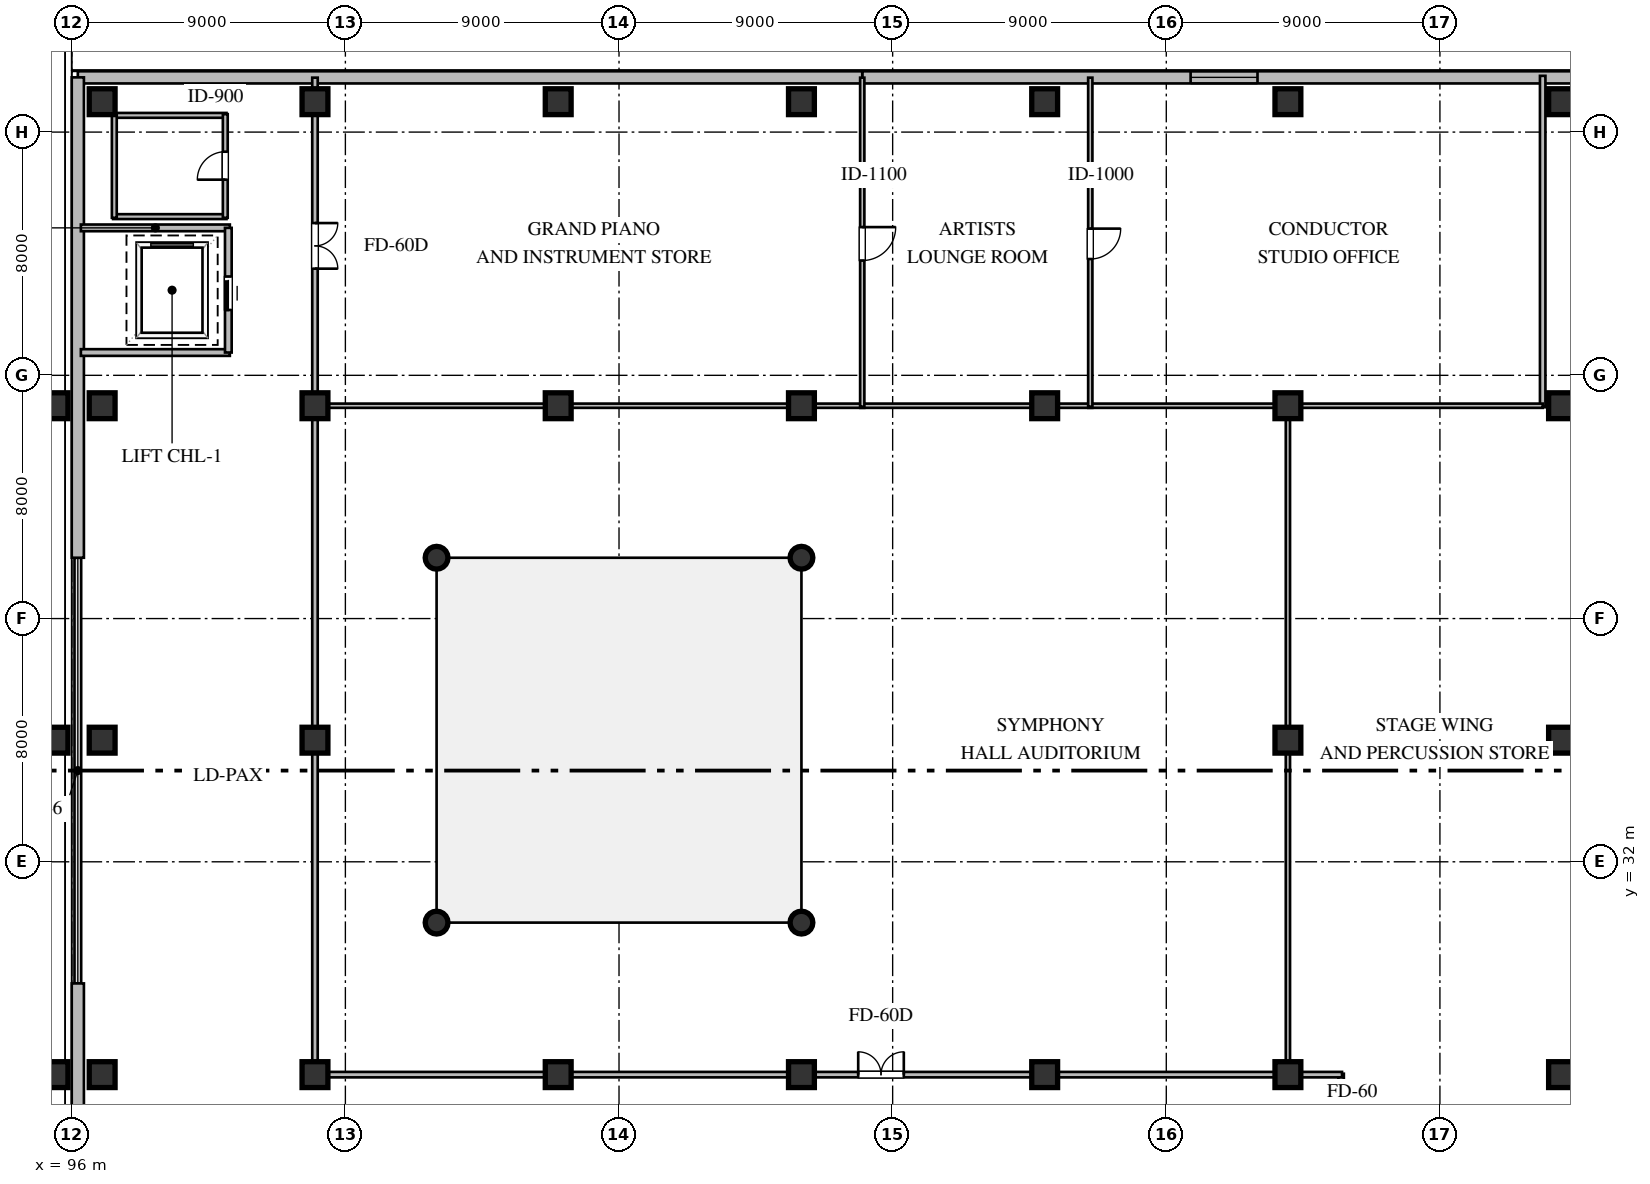
"""IFC4 building model, lengths in metres.
Left out: names, types, materials, properties, quantities, classifications, styles, units other than length and angle.
Written with IfcOpenShell. Run it as: python <this file> out.ifc"""

import sys

from ifc_helpers import new_model, si_unit, direction, frame, frame_2d, origin, origin_2d, place, context, subcontext, project, spatial, rectangle, circle, extrude, element, fill, save


model = new_model("IFC4")
c1 = context("Model", 3, precision=1e-05, world=origin(), true_north=direction((0.0, 1.0)))
c2 = subcontext(c1, "Body", "Model", "MODEL_VIEW")
j1 = project(units=[si_unit("LENGTHUNIT", "METRE"), si_unit("PLANEANGLEUNIT", "RADIAN")], contexts=[c1])
p1 = place(None, origin())
s1 = spatial("IfcSite", under=j1, at=p1, CompositionType="ELEMENT")
p2 = place(p1, origin())
s2 = spatial("IfcBuilding", under=s1, at=p2, CompositionType="ELEMENT")
p3 = place(p2, origin())
s3 = spatial("IfcBuildingStorey", under=s2, at=p3, CompositionType="ELEMENT", Elevation=0.0)
for number, where, z_axis, x_axis in (
    (1, (97.0, 25.0, 0.0), (0.0, 0.0, 1.0), (1.0, 0.0, 0.0)),
    (2, (97.0, 36.0, 0.0), (0.0, 0.0, 1.0), (1.0, 0.0, 0.0)),
    (3, (97.0, 47.0, 0.0), (0.0, 0.0, 1.0), (1.0, 0.0, 0.0)),
    (4, (97.0, 57.0, 0.0), (0.0, 0.0, 1.0), (1.0, 0.0, 0.0)),
    (5, (104.0, 25.0, 0.0), (0.0, 0.0, 1.0), (1.0, 0.0, 0.0)),
    (6, (104.0, 36.0, 0.0), (0.0, 0.0, 1.0), (1.0, 0.0, 0.0)),
    (7, (104.0, 47.0, 0.0), (0.0, 0.0, 1.0), (1.0, 0.0, 0.0)),
    (8, (104.0, 57.0, 0.0), (0.0, 0.0, 1.0), (1.0, 0.0, 0.0)),
    (9, (112.0, 25.0, 0.0), (0.0, 0.0, 1.0), (1.0, 0.0, 0.0)),
    (10, (112.0, 47.0, 0.0), (0.0, 0.0, 1.0), (1.0, 0.0, 0.0)),
    (11, (112.0, 57.0, 0.0), (0.0, 0.0, 1.0), (1.0, 0.0, 0.0)),
    (12, (120.0, 25.0, 0.0), (0.0, 0.0, 1.0), (1.0, 0.0, 0.0)),
    (13, (120.0, 47.0, 0.0), (0.0, 0.0, 1.0), (1.0, 0.0, 0.0)),
    (14, (120.0, 57.0, 0.0), (0.0, 0.0, 1.0), (1.0, 0.0, 0.0)),
    (15, (128.0, 25.0, 0.0), (0.0, 0.0, 1.0), (1.0, 0.0, 0.0)),
    (16, (128.0, 47.0, 0.0), (0.0, 0.0, 1.0), (1.0, 0.0, 0.0)),
    (17, (128.0, 57.0, 0.0), (0.0, 0.0, 1.0), (1.0, 0.0, 0.0)),
    (18, (136.0, 25.0, 0.0), (0.0, 0.0, 1.0), (1.0, 0.0, 0.0)),
    (19, (136.0, 36.0, 0.0), (0.0, 0.0, 1.0), (1.0, 0.0, 0.0)),
    (20, (136.0, 47.0, 0.0), (0.0, 0.0, 1.0), (1.0, 0.0, 0.0)),
    (21, (136.0, 57.0, 0.0), (0.0, 0.0, 1.0), (1.0, 0.0, 0.0)),
    (22, (145.0, 25.0, 0.0), (0.0, 0.0, 1.0), (1.0, 0.0, 0.0)),
    (23, (145.0, 36.0, 0.0), (0.0, 0.0, 1.0), (1.0, 0.0, 0.0)),
    (24, (145.0, 47.0, 0.0), (0.0, 0.0, 1.0), (1.0, 0.0, 0.0)),
    (25, (145.0, 57.0, 0.0), (0.0, 0.0, 1.0), (1.0, 0.0, 0.0)),
    (26, (95.45, 25.0, 0.0), (0.0, 0.0, 1.0), (1.0, 0.0, 0.0)),
    (27, (95.45, 36.0, 0.0), (0.0, 0.0, 1.0), (1.0, 0.0, 0.0)),
    (28, (95.45, 47.0, 0.0), (0.0, 0.0, 1.0), (1.0, 0.0, 0.0)),
):
    element("IfcColumn", number, at=place(p3, frame(where, z_axis=z_axis, x_axis=x_axis)), inside=s3, PredefinedType="COLUMN", context=c2, shape_type="SweptSolid", body=[
        extrude(rectangle(XDim=0.85, YDim=0.85, at=origin_2d()), origin(), (0.0, 0.0, 1.0), 4.8),
    ])
for number, where, z_axis, x_axis in (
    (29, (108.0, 30.0, 0.0), (0.0, 0.0, 1.0), (1.0, 0.0, 0.0)),
    (30, (108.0, 42.0, 0.0), (0.0, 0.0, 1.0), (1.0, 0.0, 0.0)),
):
    element("IfcColumn", number, at=place(p3, frame(where, z_axis=z_axis, x_axis=x_axis)), inside=s3, PredefinedType="COLUMN", context=c2, shape_type="SweptSolid", body=[
        extrude(circle(Radius=0.375, at=origin_2d()), origin(), (0.0, 0.0, 1.0), 2.13),
    ])
for number, where, z_axis, x_axis in (
    (31, (120.0, 30.0, 0.0), (0.0, 0.0, 1.0), (1.0, 0.0, 0.0)),
    (32, (120.0, 42.0, 0.0), (0.0, 0.0, 1.0), (1.0, 0.0, 0.0)),
):
    element("IfcColumn", number, at=place(p3, frame(where, z_axis=z_axis, x_axis=x_axis)), inside=s3, PredefinedType="COLUMN", context=c2, shape_type="SweptSolid", body=[
        extrude(circle(Radius=0.375, at=origin_2d()), origin(), (0.0, 0.0, 1.0), 0.44),
    ])
p4 = place(p3, frame((145.8, 57.8, 0.0), z_axis=(0.0, 0.0, 1.0), x_axis=(-1.0, 0.0, 0.0)))
e33 = element("IfcWall", 33, at=p4, inside=s3, PredefinedType="STANDARD", context=c2, shape_type="SweptSolid", body=[
    extrude(rectangle(XDim=23.8, YDim=0.4, at=frame_2d((11.9, 0.0))), origin(), (0.0, 0.0, 1.0), 4.52),
])
p5 = place(p4, frame((10.8, 0.0, 1.25)))
e34 = element("IfcOpeningElement", 34, at=p5, cuts=e33, PredefinedType="OPENING", context=c2, shape_type="SweptSolid", body=[
    extrude(rectangle(XDim=2.2, YDim=1.5, at=frame_2d((1.1, 0.75))), frame((0.0, 0.21, 0.0), z_axis=(0.0, -1.0, 0.0), x_axis=(1.0, 0.0, 0.0)), (0.0, 0.0, 1.0), 0.42),
])
p6 = place(p3, frame((122.0, 57.8, 0.0), z_axis=(0.0, 0.0, 1.0), x_axis=(-1.0, 0.0, 0.0)))
e35 = element("IfcWall", 35, at=p6, inside=s3, PredefinedType="STANDARD", context=c2, shape_type="SweptSolid", body=[
    extrude(rectangle(XDim=25.8, YDim=0.4, at=frame_2d((12.9, 0.0))), origin(), (0.0, 0.0, 1.0), 4.52),
])
p7 = place(p3, frame((96.2, 57.8, 0.0), z_axis=(0.0, 0.0, 1.0), x_axis=(0.0, -1.0, 0.0)))
e36 = element("IfcWall", 36, at=p7, inside=s3, PredefinedType="STANDARD", context=c2, shape_type="SweptSolid", body=[
    extrude(rectangle(XDim=15.8, YDim=0.4, at=frame_2d((7.9, 0.0))), origin(), (0.0, 0.0, 1.0), 4.52),
])
p8 = place(p3, frame((96.2, 28.0, 0.0), z_axis=(0.0, 0.0, 1.0), x_axis=(0.0, -1.0, 0.0)))
e37 = element("IfcWall", 37, at=p8, inside=s3, PredefinedType="STANDARD", context=c2, shape_type="SweptSolid", body=[
    extrude(rectangle(XDim=13.8, YDim=0.4, at=frame_2d((6.9, 0.0))), origin(), (0.0, 0.0, 1.0), 4.52),
])
for number, where, z_axis, x_axis in (
    (38, (96.3, 52.85, 0.0), (0.0, 0.0, 1.0), (1.0, 0.0, 0.0)),
    (39, (96.3, 48.75, 0.0), (0.0, 0.0, 1.0), (1.0, 0.0, 0.0)),
):
    element("IfcWall", number, at=place(p3, frame(where, z_axis=z_axis, x_axis=x_axis)), inside=s3, PredefinedType="SOLIDWALL", context=c2, shape_type="SweptSolid", body=[
        extrude(rectangle(XDim=4.9, YDim=0.22, at=frame_2d((2.45, 0.0))), origin(), (0.0, 0.0, 1.0), 4.52),
    ])
p9 = place(p3, frame((101.15, 48.75, 0.0), z_axis=(0.0, 0.0, 1.0), x_axis=(0.0, 1.0, 0.0)))
e40 = element("IfcWall", 40, at=p9, inside=s3, PredefinedType="SOLIDWALL", context=c2, shape_type="SweptSolid", body=[
    extrude(rectangle(XDim=4.1, YDim=0.22, at=frame_2d((2.05, 0.0))), origin(), (0.0, 0.0, 1.0), 4.52),
])
p10 = place(p9, frame((1.4, 0.0, 0.0)))
e41 = element("IfcOpeningElement", 41, at=p10, cuts=e40, PredefinedType="OPENING", context=c2, shape_type="SweptSolid", body=[
    extrude(rectangle(XDim=1.1, YDim=2.1, at=frame_2d((0.55, 1.05))), frame((0.0, 0.12, 0.0), z_axis=(0.0, -1.0, 0.0), x_axis=(1.0, 0.0, 0.0)), (0.0, 0.0, 1.0), 0.24),
])
p11 = place(p3, frame((97.36, 53.22, 0.0), z_axis=(0.0, 0.0, 1.0), x_axis=(1.0, 0.0, 0.0)))
e42 = element("IfcWall", 42, at=p11, inside=s3, PredefinedType="PLUMBINGWALL", context=c2, shape_type="SweptSolid", body=[
    extrude(rectangle(XDim=3.73, YDim=0.16, at=frame_2d((1.865, 0.0))), origin(), (0.0, 0.0, 1.0), 4.52),
])
p12 = place(p3, frame((97.36, 56.55, 0.0), z_axis=(0.0, 0.0, 1.0), x_axis=(1.0, 0.0, 0.0)))
e43 = element("IfcWall", 43, at=p12, inside=s3, PredefinedType="PLUMBINGWALL", context=c2, shape_type="SweptSolid", body=[
    extrude(rectangle(XDim=3.73, YDim=0.16, at=frame_2d((1.865, 0.0))), origin(), (0.0, 0.0, 1.0), 3.899),
])
p13 = place(p3, frame((97.4, 53.18, 0.0), z_axis=(0.0, 0.0, 1.0), x_axis=(0.0, 1.0, 0.0)))
e44 = element("IfcWall", 44, at=p13, inside=s3, PredefinedType="PLUMBINGWALL", context=c2, shape_type="SweptSolid", body=[
    extrude(rectangle(XDim=3.41, YDim=0.16, at=frame_2d((1.705, 0.0))), origin(), (0.0, 0.0, 1.0), 4.093),
])
p14 = place(p3, frame((101.05, 53.18, 0.0), z_axis=(0.0, 0.0, 1.0), x_axis=(0.0, 1.0, 0.0)))
e45 = element("IfcWall", 45, at=p14, inside=s3, PredefinedType="PLUMBINGWALL", context=c2, shape_type="SweptSolid", body=[
    extrude(rectangle(XDim=3.41, YDim=0.16, at=frame_2d((1.705, 0.0))), origin(), (0.0, 0.0, 1.0), 4.52),
])
p15 = place(p14, frame((1.255, 0.0, 0.0)))
e46 = element("IfcOpeningElement", 46, at=p15, cuts=e45, PredefinedType="OPENING", context=c2, shape_type="SweptSolid", body=[
    extrude(rectangle(XDim=0.92, YDim=2.1, at=frame_2d((0.46, 1.05))), frame((0.0, 0.09, 0.0), z_axis=(0.0, -1.0, 0.0), x_axis=(1.0, 0.0, 0.0)), (0.0, 0.0, 1.0), 0.18),
])
p16 = place(p3, frame((144.38, 46.95, 0.0), z_axis=(0.0, 0.0, 1.0), x_axis=(0.0, 1.0, 0.0)))
e47 = element("IfcWall", 47, at=p16, inside=s3, PredefinedType="PARTITIONING", context=c2, shape_type="SweptSolid", body=[
    extrude(rectangle(XDim=10.9, YDim=0.18, at=frame_2d((5.45, 0.0))), origin(), (0.0, 0.0, 1.0), 4.093),
])
p17 = place(p3, frame((103.97, 25.0, 0.0), z_axis=(0.0, 0.0, 1.0), x_axis=(1.0, 0.0, 0.0)))
e48 = element("IfcWall", 48, at=p17, inside=s3, PredefinedType="PARTITIONING", context=c2, shape_type="SweptSolid", body=[
    extrude(rectangle(XDim=32.095, YDim=0.18, at=frame_2d((16.047, 0.0))), origin(), (0.0, 0.0, 1.0), 3.899),
])
p18 = place(p17, frame((17.897, 0.0, 0.0)))
e49 = element("IfcOpeningElement", 49, at=p18, cuts=e48, PredefinedType="OPENING", context=c2, shape_type="SweptSolid", body=[
    extrude(rectangle(XDim=1.5, YDim=2.15, at=frame_2d((0.75, 1.075))), frame((0.0, 0.1, 0.0), z_axis=(0.0, -1.0, 0.0), x_axis=(1.0, 0.0, 0.0)), (0.0, 0.0, 1.0), 0.2),
])
p19 = place(p3, frame((104.0, 47.065, 0.0), z_axis=(0.0, 0.0, 1.0), x_axis=(0.0, -1.0, 0.0)))
e50 = element("IfcWall", 50, at=p19, inside=s3, PredefinedType="PARTITIONING", context=c2, shape_type="SweptSolid", body=[
    extrude(rectangle(XDim=22.095, YDim=0.18, at=frame_2d((11.047, 0.0))), origin(), (0.0, 0.0, 1.0), 4.093),
])
p20 = place(p3, frame((104.0, 57.79, 0.0), z_axis=(0.0, 0.0, 1.0), x_axis=(0.0, -1.0, 0.0)))
e51 = element("IfcWall", 51, at=p20, inside=s3, PredefinedType="PARTITIONING", context=c2, shape_type="SweptSolid", body=[
    extrude(rectangle(XDim=10.855, YDim=0.18, at=frame_2d((5.427, 0.0))), origin(), (0.0, 0.0, 1.0), 4.093),
])
p21 = place(p20, frame((4.782, 0.0, 0.0)))
e52 = element("IfcOpeningElement", 52, at=p21, cuts=e51, PredefinedType="OPENING", context=c2, shape_type="SweptSolid", body=[
    extrude(rectangle(XDim=1.5, YDim=2.15, at=frame_2d((0.75, 1.075))), frame((0.0, 0.1, 0.0), z_axis=(0.0, -1.0, 0.0), x_axis=(1.0, 0.0, 0.0)), (0.0, 0.0, 1.0), 0.2),
])
p22 = place(p3, frame((137.75, 25.03, 0.0), z_axis=(0.0, 0.0, 1.0), x_axis=(0.0, -1.0, 0.0)))
e53 = element("IfcWall", 53, at=p22, inside=s3, PredefinedType="PARTITIONING", context=c2, shape_type="SweptSolid", body=[
    extrude(rectangle(XDim=5.845, YDim=0.18, at=frame_2d((2.922, 0.0))), origin(), (0.0, 0.0, 1.0), 4.52),
])
p23 = place(p22, frame((2.322, 0.0, 0.0)))
e54 = element("IfcOpeningElement", 54, at=p23, cuts=e53, PredefinedType="OPENING", context=c2, shape_type="SweptSolid", body=[
    extrude(rectangle(XDim=1.05, YDim=2.1, at=frame_2d((0.525, 1.05))), frame((0.0, 0.1, 0.0), z_axis=(0.0, -1.0, 0.0), x_axis=(1.0, 0.0, 0.0)), (0.0, 0.0, 1.0), 0.2),
])
p24 = place(p3, frame((135.935, 25.0, 0.0), z_axis=(0.0, 0.0, 1.0), x_axis=(1.0, 0.0, 0.0)))
e55 = element("IfcWall", 55, at=p24, inside=s3, PredefinedType="PARTITIONING", context=c2, shape_type="SweptSolid", body=[
    extrude(rectangle(XDim=1.845, YDim=0.18, at=frame_2d((0.922, 0.0))), origin(), (0.0, 0.0, 1.0), 3.899),
])
p25 = place(p3, frame((103.97, 47.0, 0.0), z_axis=(0.0, 0.0, 1.0), x_axis=(1.0, 0.0, 0.0)))
e56 = element("IfcWall", 56, at=p25, inside=s3, PredefinedType="PARTITIONING", context=c2, shape_type="SweptSolid", body=[
    extrude(rectangle(XDim=18.095, YDim=0.14, at=frame_2d((9.047, 0.0))), origin(), (0.0, 0.0, 1.0), 3.899),
])
p26 = place(p3, frame((121.935, 47.0, 0.0), z_axis=(0.0, 0.0, 1.0), x_axis=(1.0, 0.0, 0.0)))
e57 = element("IfcWall", 57, at=p26, inside=s3, PredefinedType="PARTITIONING", context=c2, shape_type="SweptSolid", body=[
    extrude(rectangle(XDim=7.63, YDim=0.14, at=frame_2d((3.815, 0.0))), origin(), (0.0, 0.0, 1.0), 3.899),
])
p27 = place(p3, frame((129.435, 47.0, 0.0), z_axis=(0.0, 0.0, 1.0), x_axis=(1.0, 0.0, 0.0)))
e58 = element("IfcWall", 58, at=p27, inside=s3, PredefinedType="PARTITIONING", context=c2, shape_type="SweptSolid", body=[
    extrude(rectangle(XDim=6.595, YDim=0.14, at=frame_2d((3.297, 0.0))), origin(), (0.0, 0.0, 1.0), 3.899),
])
p28 = place(p3, frame((136.0, 47.03, 0.0), z_axis=(0.0, 0.0, 1.0), x_axis=(0.0, -1.0, 0.0)))
e59 = element("IfcWall", 59, at=p28, inside=s3, PredefinedType="PARTITIONING", context=c2, shape_type="SweptSolid", body=[
    extrude(rectangle(XDim=22.06, YDim=0.14, at=frame_2d((11.03, 0.0))), origin(), (0.0, 0.0, 1.0), 4.093),
])
p29 = place(p3, frame((122.0, 57.79, 0.0), z_axis=(0.0, 0.0, 1.0), x_axis=(0.0, -1.0, 0.0)))
e60 = element("IfcWall", 60, at=p29, inside=s3, PredefinedType="PARTITIONING", context=c2, shape_type="SweptSolid", body=[
    extrude(rectangle(XDim=10.82, YDim=0.14, at=frame_2d((5.41, 0.0))), origin(), (0.0, 0.0, 1.0), 4.52),
])
p30 = place(p29, frame((4.915, 0.0, 0.0)))
e61 = element("IfcOpeningElement", 61, at=p30, cuts=e60, PredefinedType="OPENING", context=c2, shape_type="SweptSolid", body=[
    extrude(rectangle(XDim=1.1, YDim=2.1, at=frame_2d((0.55, 1.05))), frame((0.0, 0.08, 0.0), z_axis=(0.0, -1.0, 0.0), x_axis=(1.0, 0.0, 0.0)), (0.0, 0.0, 1.0), 0.16),
])
p31 = place(p3, frame((129.5, 57.79, 0.0), z_axis=(0.0, 0.0, 1.0), x_axis=(0.0, -1.0, 0.0)))
e62 = element("IfcWall", 62, at=p31, inside=s3, PredefinedType="PARTITIONING", context=c2, shape_type="SweptSolid", body=[
    extrude(rectangle(XDim=10.82, YDim=0.14, at=frame_2d((5.41, 0.0))), origin(), (0.0, 0.0, 1.0), 4.52),
])
p32 = place(p31, frame((4.965, 0.0, 0.0)))
e63 = element("IfcOpeningElement", 63, at=p32, cuts=e62, PredefinedType="OPENING", context=c2, shape_type="SweptSolid", body=[
    extrude(rectangle(XDim=1.0, YDim=2.1, at=frame_2d((0.5, 1.05))), frame((0.0, 0.08, 0.0), z_axis=(0.0, -1.0, 0.0), x_axis=(1.0, 0.0, 0.0)), (0.0, 0.0, 1.0), 0.16),
])
p33 = place(p3, frame((144.38, 47.0, 0.0), z_axis=(0.0, 0.0, 1.0), x_axis=(-1.0, 0.0, 0.0)))
e64 = element("IfcWall", 64, at=p33, inside=s3, PredefinedType="PARTITIONING", context=c2, shape_type="SweptSolid", body=[
    extrude(rectangle(XDim=8.445, YDim=0.14, at=frame_2d((4.222, 0.0))), origin(), (0.0, 0.0, 1.0), 3.899),
])
p34 = place(p5, origin())
e65 = element("IfcWindow", 65, at=p34, inside=s3, PartitioningType="SINGLE_PANEL", PredefinedType="WINDOW", context=c2, shape_type="SweptSolid", body=[
    extrude(rectangle(XDim=2.2, YDim=1.5, at=frame_2d((1.1, 0.75))), frame((0.0, 0.03, 0.0), z_axis=(0.0, -1.0, 0.0), x_axis=(1.0, 0.0, 0.0)), (0.0, 0.0, 1.0), 0.06),
])
fill(e34, e65)
p35 = place(p10, origin())
e66 = element("IfcDoor", 66, at=p35, inside=s3, OperationType="SLIDING_TO_LEFT", PredefinedType="DOOR", context=c2, shape_type="SweptSolid", body=[
    extrude(rectangle(XDim=1.1, YDim=2.1, at=frame_2d((0.55, 1.05))), frame((0.0, 0.025, 0.0), z_axis=(0.0, -1.0, 0.0), x_axis=(1.0, 0.0, 0.0)), (0.0, 0.0, 1.0), 0.05),
])
fill(e41, e66)
p36 = place(p15, origin())
e67 = element("IfcDoor", 67, at=p36, inside=s3, OperationType="SINGLE_SWING_LEFT", PredefinedType="DOOR", context=c2, shape_type="SweptSolid", body=[
    extrude(rectangle(XDim=0.92, YDim=2.1, at=frame_2d((0.46, 1.05))), frame((0.0, 0.025, 0.0), z_axis=(0.0, -1.0, 0.0), x_axis=(1.0, 0.0, 0.0)), (0.0, 0.0, 1.0), 0.05),
])
fill(e46, e67)
p37 = place(p18, origin())
e68 = element("IfcDoor", 68, at=p37, inside=s3, OperationType="DOUBLE_DOOR_SINGLE_SWING", PredefinedType="DOOR", context=c2, shape_type="SweptSolid", body=[
    extrude(rectangle(XDim=1.5, YDim=2.15, at=frame_2d((0.75, 1.075))), frame((0.0, 0.025, 0.0), z_axis=(0.0, -1.0, 0.0), x_axis=(1.0, 0.0, 0.0)), (0.0, 0.0, 1.0), 0.05),
])
fill(e49, e68)
p38 = place(p21, origin())
e69 = element("IfcDoor", 69, at=p38, inside=s3, OperationType="DOUBLE_DOOR_SINGLE_SWING", PredefinedType="DOOR", context=c2, shape_type="SweptSolid", body=[
    extrude(rectangle(XDim=1.5, YDim=2.15, at=frame_2d((0.75, 1.075))), frame((0.0, 0.025, 0.0), z_axis=(0.0, -1.0, 0.0), x_axis=(1.0, 0.0, 0.0)), (0.0, 0.0, 1.0), 0.05),
])
fill(e52, e69)
p39 = place(p30, origin())
e70 = element("IfcDoor", 70, at=p39, inside=s3, OperationType="SINGLE_SWING_LEFT", PredefinedType="DOOR", context=c2, shape_type="SweptSolid", body=[
    extrude(rectangle(XDim=1.1, YDim=2.1, at=frame_2d((0.55, 1.05))), frame((0.0, 0.025, 0.0), z_axis=(0.0, -1.0, 0.0), x_axis=(1.0, 0.0, 0.0)), (0.0, 0.0, 1.0), 0.05),
])
fill(e61, e70)
p40 = place(p32, origin())
e71 = element("IfcDoor", 71, at=p40, inside=s3, OperationType="SINGLE_SWING_LEFT", PredefinedType="DOOR", context=c2, shape_type="SweptSolid", body=[
    extrude(rectangle(XDim=1.0, YDim=2.1, at=frame_2d((0.5, 1.05))), frame((0.0, 0.025, 0.0), z_axis=(0.0, -1.0, 0.0), x_axis=(1.0, 0.0, 0.0)), (0.0, 0.0, 1.0), 0.05),
])
fill(e63, e71)
save(model, sys.argv[1])
